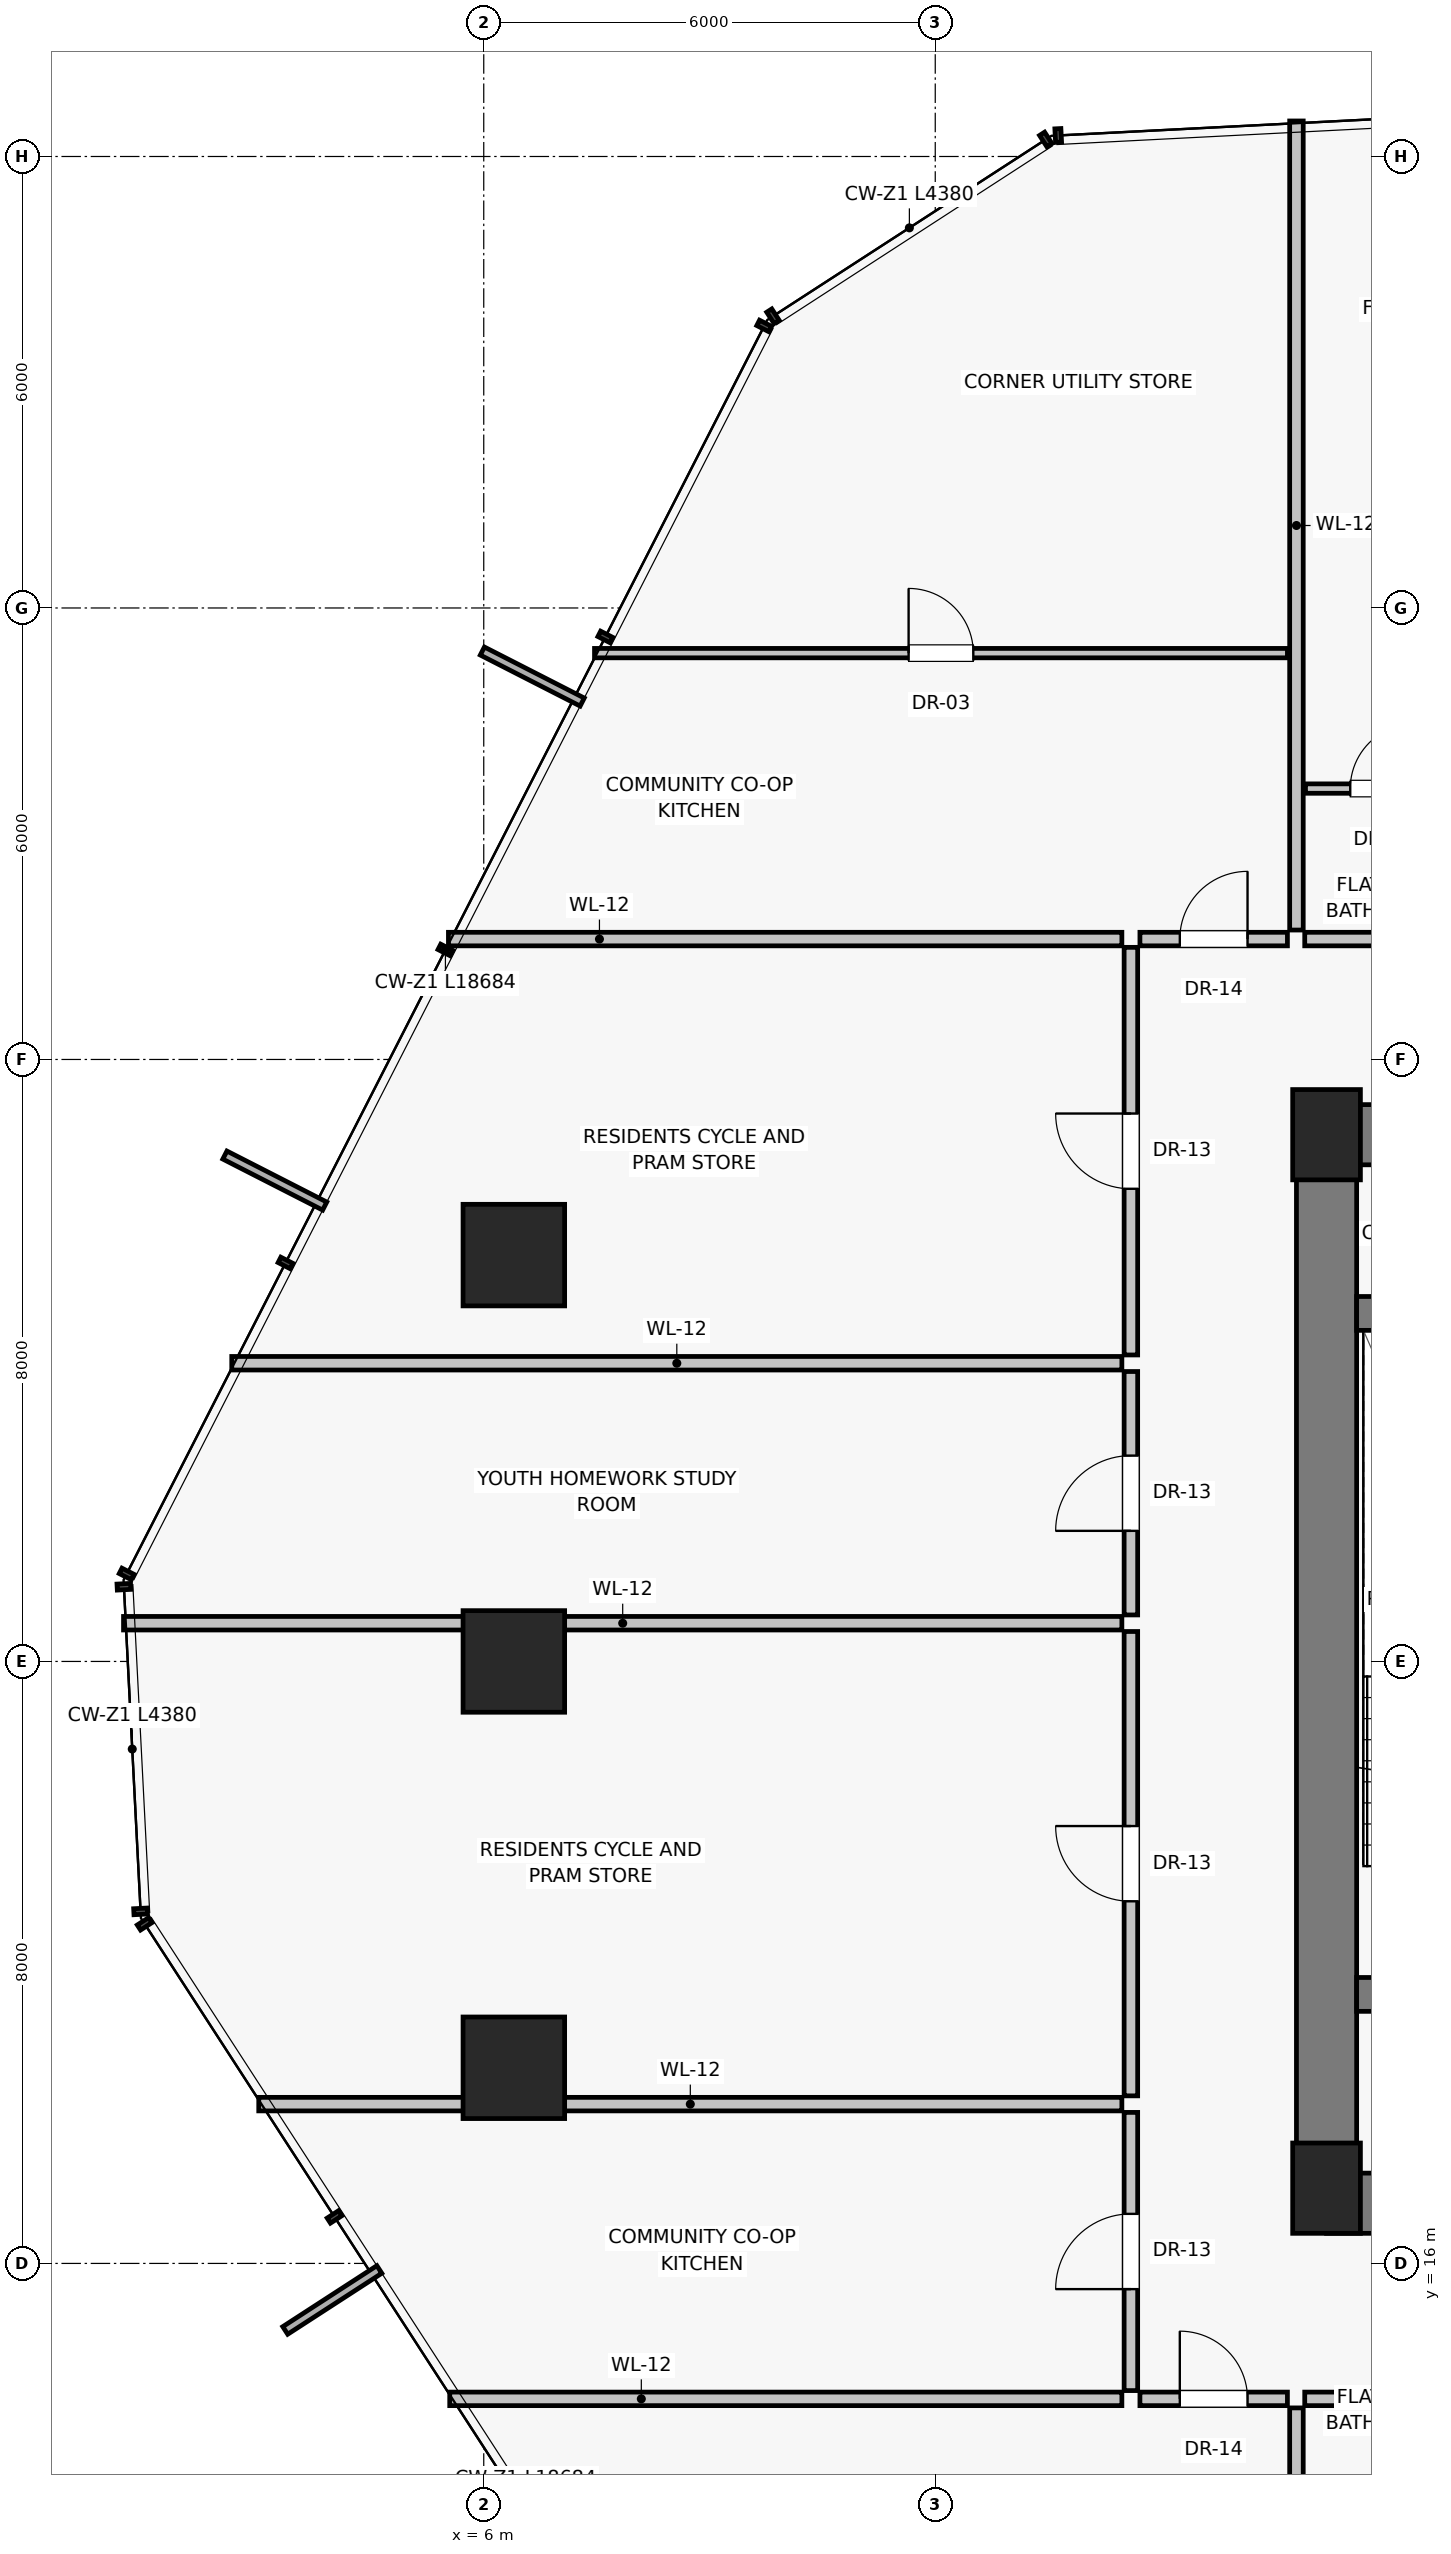
"""IFC4 building model, lengths in metres.
Left out: names, types, materials, properties, quantities, classifications, styles, units other than length and angle.
Written with IfcOpenShell. Run it as: python <this file> out.ifc"""

import sys

from ifc_helpers import new_model, si_unit, direction, frame, frame_2d, origin, origin_2d, place, context, subcontext, project, spatial, rectangle, extrude, source, transform, mapped, element, fill, save


model = new_model("IFC4")
c1 = context("Model", 3, precision=1e-05, world=origin(), true_north=direction((0.0, 1.0)))
c2 = subcontext(c1, "Body", "Model", "MODEL_VIEW")
j1 = project(units=[si_unit("LENGTHUNIT", "METRE"), si_unit("PLANEANGLEUNIT", "RADIAN")], contexts=[c1])
p1 = place(None, origin())
s1 = spatial("IfcSite", under=j1, at=p1, CompositionType="ELEMENT")
p2 = place(p1, origin())
s2 = spatial("IfcBuilding", under=s1, at=p2, CompositionType="ELEMENT")
p3 = place(p2, frame((0.0, 0.0, 33.8)))
s3 = spatial("IfcBuildingStorey", under=s2, at=p3, CompositionType="ELEMENT", Elevation=33.8)
for number, where, z_axis, x_axis in (
    (1, (17.2, 17.0, 0.0), (0.0, 0.0, 1.0), (1.0, 0.0, 0.0)),
    (2, (17.2, 31.0, 0.0), (0.0, 0.0, 1.0), (1.0, 0.0, 0.0)),
):
    element("IfcColumn", number, at=place(p3, frame(where, z_axis=z_axis, x_axis=x_axis)), inside=s3, PredefinedType="PILASTER", context=c2, shape_type="SweptSolid", body=[
        extrude(rectangle(XDim=0.9, YDim=1.2, at=origin_2d()), origin(), (0.0, 0.0, 1.0), 3.25),
    ])
for number, where, z_axis, x_axis in (
    (3, (6.4, 29.4, 0.0), (0.0, 0.0, 1.0), (1.0, 0.0, 0.0)),
    (4, (6.4, 24.0, 0.0), (0.0, 0.0, 1.0), (1.0, 0.0, 0.0)),
    (5, (6.4, 18.6, 0.0), (0.0, 0.0, 1.0), (1.0, 0.0, 0.0)),
):
    element("IfcColumn", number, at=place(p3, frame(where, z_axis=z_axis, x_axis=x_axis)), inside=s3, PredefinedType="COLUMN", context=c2, shape_type="SweptSolid", body=[
        extrude(rectangle(XDim=1.35, YDim=1.35, at=origin_2d()), origin(), (0.0, 0.0, 1.0), 3.25),
    ])
p4 = place(p3, frame((17.2, 16.8, 0.0), z_axis=(0.0, 0.0, 1.0), x_axis=(0.0, 1.0, 0.0)))
e6 = element("IfcWall", 6, at=p4, inside=s3, PredefinedType="SHEAR", context=c2, shape_type="SweptSolid", body=[
    extrude(rectangle(XDim=14.2, YDim=0.8, at=frame_2d((7.1, 0.0))), origin(), (0.0, 0.0, 1.0), 3.0),
])
p5 = place(p3, frame((17.2, 16.8, 0.0), z_axis=(0.0, 0.0, 1.0), x_axis=(1.0, 0.0, 0.0)))
e7 = element("IfcWall", 7, at=p5, inside=s3, PredefinedType="SHEAR", context=c2, shape_type="SweptSolid", body=[
    extrude(rectangle(XDim=5.85, YDim=0.8, at=frame_2d((2.925, 0.0))), origin(), (0.0, 0.0, 1.0), 3.0),
])
p6 = place(p5, frame((1.15, 0.0, 0.0)))
e8 = element("IfcOpeningElement", 8, at=p6, cuts=e7, PredefinedType="OPENING", context=c2, shape_type="SweptSolid", body=[
    extrude(rectangle(XDim=1.2, YDim=2.03, at=frame_2d((0.6, 1.015))), frame((0.0, 0.41, 0.0), z_axis=(0.0, -1.0, 0.0), x_axis=(1.0, 0.0, 0.0)), (0.0, 0.0, 1.0), 0.82),
])
p7 = place(p3, frame((17.2, 31.0, 0.0), z_axis=(0.0, 0.0, 1.0), x_axis=(1.0, 0.0, 0.0)))
e9 = element("IfcWall", 9, at=p7, inside=s3, PredefinedType="SHEAR", context=c2, shape_type="SweptSolid", body=[
    extrude(rectangle(XDim=3.8, YDim=0.8, at=frame_2d((1.9, 0.0))), origin(), (0.0, 0.0, 1.0), 3.0),
])
p8 = place(p7, frame((1.25, 0.0, 0.0)))
e10 = element("IfcOpeningElement", 10, at=p8, cuts=e9, PredefinedType="OPENING", context=c2, shape_type="SweptSolid", body=[
    extrude(rectangle(XDim=0.86, YDim=2.01, at=frame_2d((0.43, 1.005))), frame((0.0, 0.41, 0.0), z_axis=(0.0, -1.0, 0.0), x_axis=(1.0, 0.0, 0.0)), (0.0, 0.0, 1.0), 0.82),
])
p9 = place(p3, frame((17.6, 19.575, 0.0), z_axis=(0.0, 0.0, 1.0), x_axis=(1.0, 0.0, 0.0)))
e11 = element("IfcWall", 11, at=p9, inside=s3, PredefinedType="SHEAR", context=c2, shape_type="SweptSolid", body=[
    extrude(rectangle(XDim=3.425, YDim=0.45, at=frame_2d((1.712, 0.0))), origin(), (0.0, 0.0, 1.0), 3.0),
])
p10 = place(p9, frame((1.05, 0.0, 0.0)))
e12 = element("IfcOpeningElement", 12, at=p10, cuts=e11, PredefinedType="OPENING", context=c2, shape_type="SweptSolid", body=[
    extrude(rectangle(XDim=1.1, YDim=2.03, at=frame_2d((0.55, 1.015))), frame((0.0, 0.235, 0.0), z_axis=(0.0, -1.0, 0.0), x_axis=(1.0, 0.0, 0.0)), (0.0, 0.0, 1.0), 0.47),
])
p11 = place(p3, frame((17.6, 28.625, 0.0), z_axis=(0.0, 0.0, 1.0), x_axis=(1.0, 0.0, 0.0)))
e13 = element("IfcWall", 13, at=p11, inside=s3, PredefinedType="SHEAR", context=c2, shape_type="SweptSolid", body=[
    extrude(rectangle(XDim=3.425, YDim=0.45, at=frame_2d((1.712, 0.0))), origin(), (0.0, 0.0, 1.0), 3.0),
])
p12 = place(p3, frame((16.8, 14.08, 0.0), z_axis=(0.0, 0.0, 1.0), x_axis=(0.0, -1.0, 0.0)))
e14 = element("IfcWall", 14, at=p12, inside=s3, PredefinedType="PARTITIONING", context=c2, shape_type="SweptSolid", body=[
    extrude(rectangle(XDim=11.292, YDim=0.18, at=frame_2d((5.646, 0.0))), origin(), (0.0, 0.0, 1.0), 3.0),
])
p13 = place(p3, frame((16.91, 14.2, 0.0), z_axis=(0.0, 0.0, 1.0), x_axis=(1.0, 0.0, 0.0)))
e15 = element("IfcWall", 15, at=p13, inside=s3, PredefinedType="PARTITIONING", context=c2, shape_type="SweptSolid", body=[
    extrude(rectangle(XDim=7.238, YDim=0.18, at=frame_2d((3.619, 0.0))), origin(), (0.0, 0.0, 1.0), 3.0),
])
p14 = place(p13, frame((2.64, 0.0, 0.0)))
e16 = element("IfcOpeningElement", 16, at=p14, cuts=e15, PredefinedType="OPENING", context=c2, shape_type="SweptSolid", body=[
    extrude(rectangle(XDim=0.95, YDim=2.02, at=frame_2d((0.475, 1.01))), frame((0.0, 0.1, 0.0), z_axis=(0.0, -1.0, 0.0), x_axis=(1.0, 0.0, 0.0)), (0.0, 0.0, 1.0), 0.2),
])
p15 = place(p3, frame((16.8, 33.72, 0.0), z_axis=(0.0, 0.0, 1.0), x_axis=(0.0, 1.0, 0.0)))
e17 = element("IfcWall", 17, at=p15, inside=s3, PredefinedType="PARTITIONING", context=c2, shape_type="SweptSolid", body=[
    extrude(rectangle(XDim=10.752, YDim=0.18, at=frame_2d((5.376, 0.0))), origin(), (0.0, 0.0, 1.0), 3.0),
])
p16 = place(p3, frame((16.91, 33.6, 0.0), z_axis=(0.0, 0.0, 1.0), x_axis=(1.0, 0.0, 0.0)))
e18 = element("IfcWall", 18, at=p16, inside=s3, PredefinedType="PARTITIONING", context=c2, shape_type="SweptSolid", body=[
    extrude(rectangle(XDim=7.832, YDim=0.18, at=frame_2d((3.916, 0.0))), origin(), (0.0, 0.0, 1.0), 3.0),
])
p17 = place(p16, frame((2.754, 0.0, 0.0)))
e19 = element("IfcOpeningElement", 19, at=p17, cuts=e18, PredefinedType="OPENING", context=c2, shape_type="SweptSolid", body=[
    extrude(rectangle(XDim=0.95, YDim=2.02, at=frame_2d((0.475, 1.01))), frame((0.0, 0.1, 0.0), z_axis=(0.0, -1.0, 0.0), x_axis=(1.0, 0.0, 0.0)), (0.0, 0.0, 1.0), 0.2),
])
p18 = place(p3, frame((16.92, 35.6, 0.0), z_axis=(0.0, 0.0, 1.0), x_axis=(1.0, 0.0, 0.0)))
e20 = element("IfcWall", 20, at=p18, inside=s3, PredefinedType="PARTITIONING", context=c2, shape_type="SweptSolid", body=[
    extrude(rectangle(XDim=2.05, YDim=0.125, at=frame_2d((1.025, 0.0))), origin(), (0.0, 0.0, 1.0), 3.0),
])
p19 = place(p18, frame((0.595, 0.0, 0.0)))
e21 = element("IfcOpeningElement", 21, at=p19, cuts=e20, PredefinedType="OPENING", context=c2, shape_type="SweptSolid", body=[
    extrude(rectangle(XDim=0.86, YDim=2.01, at=frame_2d((0.43, 1.005))), frame((0.0, 0.073, 0.0), z_axis=(0.0, -1.0, 0.0), x_axis=(1.0, 0.0, 0.0)), (0.0, 0.0, 1.0), 0.145),
])
p20 = place(p3, frame((14.48, 14.2, 0.0), z_axis=(0.0, 0.0, 1.0), x_axis=(-1.0, 0.0, 0.0)))
e22 = element("IfcWall", 22, at=p20, inside=s3, PredefinedType="PARTITIONING", context=c2, shape_type="SweptSolid", body=[
    extrude(rectangle(XDim=8.932, YDim=0.18, at=frame_2d((4.466, 0.0))), origin(), (0.0, 0.0, 1.0), 3.0),
])
p21 = place(p3, frame((14.48, 33.6, 0.0), z_axis=(0.0, 0.0, 1.0), x_axis=(-1.0, 0.0, 0.0)))
e23 = element("IfcWall", 23, at=p21, inside=s3, PredefinedType="PARTITIONING", context=c2, shape_type="SweptSolid", body=[
    extrude(rectangle(XDim=8.949, YDim=0.18, at=frame_2d((4.475, 0.0))), origin(), (0.0, 0.0, 1.0), 3.0),
])
p22 = place(p3, frame((14.6, 14.31, 0.0), z_axis=(0.0, 0.0, 1.0), x_axis=(0.0, 1.0, 0.0)))
e24 = element("IfcWall", 24, at=p22, inside=s3, PredefinedType="PARTITIONING", context=c2, shape_type="SweptSolid", body=[
    extrude(rectangle(XDim=3.697, YDim=0.18, at=frame_2d((1.849, 0.0))), origin(), (0.0, 0.0, 1.0), 3.0),
])
p23 = place(p22, frame((1.348, 0.0, 0.0)))
e25 = element("IfcOpeningElement", 25, at=p23, cuts=e24, PredefinedType="OPENING", context=c2, shape_type="SweptSolid", body=[
    extrude(rectangle(XDim=1.0, YDim=2.01, at=frame_2d((0.5, 1.005))), frame((0.0, 0.1, 0.0), z_axis=(0.0, -1.0, 0.0), x_axis=(1.0, 0.0, 0.0)), (0.0, 0.0, 1.0), 0.2),
])
p24 = place(p3, frame((14.6, 18.227, 0.0), z_axis=(0.0, 0.0, 1.0), x_axis=(0.0, 1.0, 0.0)))
e26 = element("IfcWall", 26, at=p24, inside=s3, PredefinedType="PARTITIONING", context=c2, shape_type="SweptSolid", body=[
    extrude(rectangle(XDim=6.171, YDim=0.18, at=frame_2d((3.085, 0.0))), origin(), (0.0, 0.0, 1.0), 3.0),
])
p25 = place(p24, frame((2.585, 0.0, 0.0)))
e27 = element("IfcOpeningElement", 27, at=p25, cuts=e26, PredefinedType="OPENING", context=c2, shape_type="SweptSolid", body=[
    extrude(rectangle(XDim=1.0, YDim=2.01, at=frame_2d((0.5, 1.005))), frame((0.0, 0.1, 0.0), z_axis=(0.0, -1.0, 0.0), x_axis=(1.0, 0.0, 0.0)), (0.0, 0.0, 1.0), 0.2),
])
p26 = place(p3, frame((14.48, 18.117, 0.0), z_axis=(0.0, 0.0, 1.0), x_axis=(-1.0, 0.0, 0.0)))
e28 = element("IfcWall", 28, at=p26, inside=s3, PredefinedType="PARTITIONING", context=c2, shape_type="SweptSolid", body=[
    extrude(rectangle(XDim=11.47, YDim=0.18, at=frame_2d((5.735, 0.0))), origin(), (0.0, 0.0, 1.0), 2.299),
])
p27 = place(p3, frame((14.48, 24.508, 0.0), z_axis=(0.0, 0.0, 1.0), x_axis=(-1.0, 0.0, 0.0)))
e29 = element("IfcWall", 29, at=p27, inside=s3, PredefinedType="PARTITIONING", context=c2, shape_type="SweptSolid", body=[
    extrude(rectangle(XDim=13.267, YDim=0.18, at=frame_2d((6.634, 0.0))), origin(), (0.0, 0.0, 1.0), 3.0),
])
p28 = place(p3, frame((14.6, 24.618, 0.0), z_axis=(0.0, 0.0, 1.0), x_axis=(0.0, 1.0, 0.0)))
e30 = element("IfcWall", 30, at=p28, inside=s3, PredefinedType="PARTITIONING", context=c2, shape_type="SweptSolid", body=[
    extrude(rectangle(XDim=3.235, YDim=0.18, at=frame_2d((1.618, 0.0))), origin(), (0.0, 0.0, 1.0), 3.0),
])
p29 = place(p28, frame((1.117, 0.0, 0.0)))
e31 = element("IfcOpeningElement", 31, at=p29, cuts=e30, PredefinedType="OPENING", context=c2, shape_type="SweptSolid", body=[
    extrude(rectangle(XDim=1.0, YDim=2.01, at=frame_2d((0.5, 1.005))), frame((0.0, 0.1, 0.0), z_axis=(0.0, -1.0, 0.0), x_axis=(1.0, 0.0, 0.0)), (0.0, 0.0, 1.0), 0.2),
])
p30 = place(p3, frame((14.6, 28.073, 0.0), z_axis=(0.0, 0.0, 1.0), x_axis=(0.0, 1.0, 0.0)))
e32 = element("IfcWall", 32, at=p30, inside=s3, PredefinedType="PARTITIONING", context=c2, shape_type="SweptSolid", body=[
    extrude(rectangle(XDim=5.417, YDim=0.18, at=frame_2d((2.708, 0.0))), origin(), (0.0, 0.0, 1.0), 3.0),
])
p31 = place(p30, frame((2.208, 0.0, 0.0)))
e33 = element("IfcOpeningElement", 33, at=p31, cuts=e32, PredefinedType="OPENING", context=c2, shape_type="SweptSolid", body=[
    extrude(rectangle(XDim=1.0, YDim=2.01, at=frame_2d((0.5, 1.005))), frame((0.0, 0.1, 0.0), z_axis=(0.0, -1.0, 0.0), x_axis=(1.0, 0.0, 0.0)), (0.0, 0.0, 1.0), 0.2),
])
p32 = place(p3, frame((14.48, 27.963, 0.0), z_axis=(0.0, 0.0, 1.0), x_axis=(-1.0, 0.0, 0.0)))
e34 = element("IfcWall", 34, at=p32, inside=s3, PredefinedType="PARTITIONING", context=c2, shape_type="SweptSolid", body=[
    extrude(rectangle(XDim=11.829, YDim=0.18, at=frame_2d((5.915, 0.0))), origin(), (0.0, 0.0, 1.0), 3.0),
])
p33 = place(p3, frame((14.72, 14.2, 0.0), z_axis=(0.0, 0.0, 1.0), x_axis=(1.0, 0.0, 0.0)))
e35 = element("IfcWall", 35, at=p33, inside=s3, PredefinedType="PARTITIONING", context=c2, shape_type="SweptSolid", body=[
    extrude(rectangle(XDim=1.96, YDim=0.18, at=frame_2d((0.98, 0.0))), origin(), (0.0, 0.0, 1.0), 3.0),
])
p34 = place(p33, frame((0.53, 0.0, 0.0)))
e36 = element("IfcOpeningElement", 36, at=p34, cuts=e35, PredefinedType="OPENING", context=c2, shape_type="SweptSolid", body=[
    extrude(rectangle(XDim=0.9, YDim=2.01, at=frame_2d((0.45, 1.005))), frame((0.0, 0.1, 0.0), z_axis=(0.0, -1.0, 0.0), x_axis=(1.0, 0.0, 0.0)), (0.0, 0.0, 1.0), 0.2),
])
p35 = place(p3, frame((14.72, 33.6, 0.0), z_axis=(0.0, 0.0, 1.0), x_axis=(1.0, 0.0, 0.0)))
e37 = element("IfcWall", 37, at=p35, inside=s3, PredefinedType="PARTITIONING", context=c2, shape_type="SweptSolid", body=[
    extrude(rectangle(XDim=1.96, YDim=0.18, at=frame_2d((0.98, 0.0))), origin(), (0.0, 0.0, 1.0), 3.0),
])
p36 = place(p35, frame((0.53, 0.0, 0.0)))
e38 = element("IfcOpeningElement", 38, at=p36, cuts=e37, PredefinedType="OPENING", context=c2, shape_type="SweptSolid", body=[
    extrude(rectangle(XDim=0.9, YDim=2.01, at=frame_2d((0.45, 1.005))), frame((0.0, 0.1, 0.0), z_axis=(0.0, -1.0, 0.0), x_axis=(1.0, 0.0, 0.0)), (0.0, 0.0, 1.0), 0.2),
])
p37 = place(p3, frame((7.472, 37.4, 0.0), z_axis=(0.0, 0.0, 1.0), x_axis=(1.0, 0.0, 0.0)))
e39 = element("IfcWall", 39, at=p37, inside=s3, PredefinedType="PARTITIONING", context=c2, shape_type="SweptSolid", body=[
    extrude(rectangle(XDim=9.208, YDim=0.125, at=frame_2d((4.604, 0.0))), origin(), (0.0, 0.0, 1.0), 3.0),
])
p38 = place(p37, frame((4.174, 0.0, 0.0)))
e40 = element("IfcOpeningElement", 40, at=p38, cuts=e39, PredefinedType="OPENING", context=c2, shape_type="SweptSolid", body=[
    extrude(rectangle(XDim=0.86, YDim=2.01, at=frame_2d((0.43, 1.005))), frame((0.0, 0.073, 0.0), z_axis=(0.0, -1.0, 0.0), x_axis=(1.0, 0.0, 0.0)), (0.0, 0.0, 1.0), 0.145),
])
m1 = source(origin(), c2, "Body", "SweptSolid", [
    extrude(rectangle(XDim=0.86, YDim=2.01, at=frame_2d((0.43, 1.005))), frame((0.0, 0.025, 0.0), z_axis=(0.0, -1.0, 0.0), x_axis=(1.0, 0.0, 0.0)), (0.0, 0.0, 1.0), 0.05),
])
p39 = place(p19, origin())
e41 = element("IfcDoor", 41, at=p39, inside=s3, OperationType="SINGLE_SWING_RIGHT", PredefinedType="DOOR", context=c2, shape_type="MappedRepresentation", body=[
    mapped(m1, transform((0.0, 0.0, 0.0), scale=1.0)),
])
fill(e21, e41)
m2 = source(origin(), c2, "Body", "SweptSolid", [
    extrude(rectangle(XDim=1.0, YDim=2.01, at=frame_2d((0.5, 1.005))), frame((0.0, 0.025, 0.0), z_axis=(0.0, -1.0, 0.0), x_axis=(1.0, 0.0, 0.0)), (0.0, 0.0, 1.0), 0.05),
])
p40 = place(p23, origin())
e42 = element("IfcDoor", 42, at=p40, inside=s3, OperationType="SINGLE_SWING_LEFT", PredefinedType="DOOR", context=c2, shape_type="MappedRepresentation", body=[
    mapped(m2, transform((0.0, 0.0, 0.0), scale=1.0)),
])
fill(e25, e42)
p41 = place(p25, origin())
e43 = element("IfcDoor", 43, at=p41, inside=s3, OperationType="SINGLE_SWING_RIGHT", PredefinedType="DOOR", context=c2, shape_type="MappedRepresentation", body=[
    mapped(m2, transform((0.0, 0.0, 0.0), scale=1.0)),
])
fill(e27, e43)
p42 = place(p29, origin())
e44 = element("IfcDoor", 44, at=p42, inside=s3, OperationType="SINGLE_SWING_LEFT", PredefinedType="DOOR", context=c2, shape_type="MappedRepresentation", body=[
    mapped(m2, transform((0.0, 0.0, 0.0), scale=1.0)),
])
fill(e31, e44)
p43 = place(p31, origin())
e45 = element("IfcDoor", 45, at=p43, inside=s3, OperationType="SINGLE_SWING_RIGHT", PredefinedType="DOOR", context=c2, shape_type="MappedRepresentation", body=[
    mapped(m2, transform((0.0, 0.0, 0.0), scale=1.0)),
])
fill(e33, e45)
m3 = source(origin(), c2, "Body", "SweptSolid", [
    extrude(rectangle(XDim=0.9, YDim=2.01, at=frame_2d((0.45, 1.005))), frame((0.0, 0.025, 0.0), z_axis=(0.0, -1.0, 0.0), x_axis=(1.0, 0.0, 0.0)), (0.0, 0.0, 1.0), 0.05),
])
p44 = place(p34, origin())
e46 = element("IfcDoor", 46, at=p44, inside=s3, OperationType="SINGLE_SWING_LEFT", PredefinedType="DOOR", context=c2, shape_type="MappedRepresentation", body=[
    mapped(m3, transform((0.0, 0.0, 0.0), scale=1.0)),
])
fill(e36, e46)
p45 = place(p36, origin())
e47 = element("IfcDoor", 47, at=p45, inside=s3, OperationType="SINGLE_SWING_RIGHT", PredefinedType="DOOR", context=c2, shape_type="MappedRepresentation", body=[
    mapped(m3, transform((0.0, 0.0, 0.0), scale=1.0)),
])
fill(e38, e47)
p46 = place(p38, origin())
e48 = element("IfcDoor", 48, at=p46, inside=s3, OperationType="SINGLE_SWING_LEFT", PredefinedType="DOOR", context=c2, shape_type="MappedRepresentation", body=[
    mapped(m1, transform((0.0, 0.0, 0.0), scale=1.0)),
])
fill(e40, e48)
save(model, sys.argv[1])
